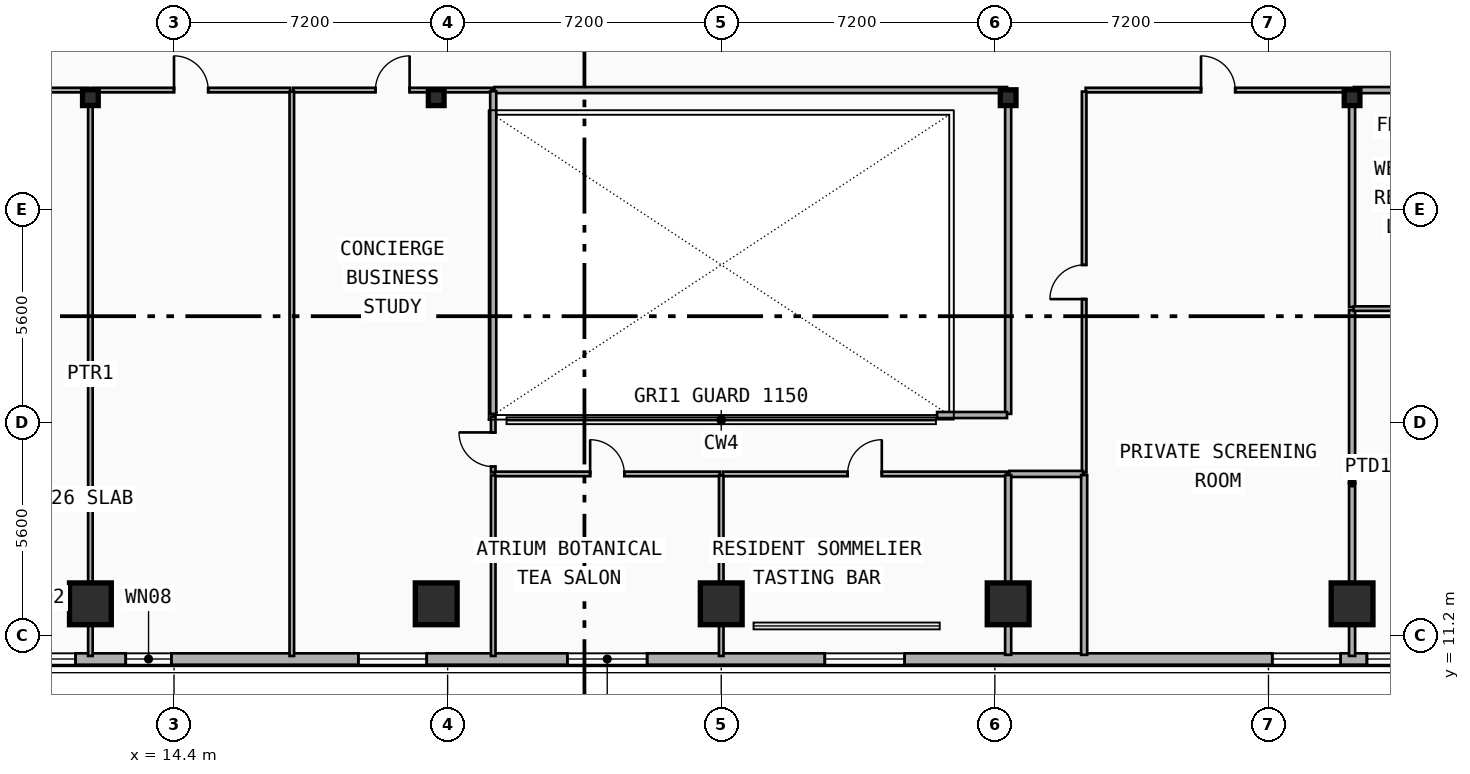
"""IFC4 building model, lengths in metres.
Left out: names, types, materials, properties, quantities, classifications, styles, units other than length and angle.
Written with IfcOpenShell. Run it as: python <this file> out.ifc"""

import sys

from ifc_helpers import new_model, si_unit, direction, frame, frame_2d, origin, origin_2d, place, context, subcontext, project, spatial, rectangle, i_section, extrude, element, fill, save


model = new_model("IFC4")
c1 = context("Model", 3, precision=1e-05, world=origin(), true_north=direction((0.0, 1.0)))
c2 = subcontext(c1, "Body", "Model", "MODEL_VIEW")
j1 = project(units=[si_unit("LENGTHUNIT", "METRE"), si_unit("PLANEANGLEUNIT", "RADIAN")], contexts=[c1])
p1 = place(None, origin())
s1 = spatial("IfcSite", under=j1, at=p1, CompositionType="ELEMENT")
p2 = place(p1, origin())
s2 = spatial("IfcBuilding", under=s1, at=p2, CompositionType="ELEMENT")
p3 = place(p2, frame((0.0, 0.0, 155.45)))
s3 = spatial("IfcBuildingStorey", under=s2, at=p3, CompositionType="ELEMENT", Elevation=155.45)
for number, where, z_axis, x_axis in (
    (1, (12.2, 25.35, 0.0), (0.0, 0.0, 1.0), (1.0, 0.0, 0.0)),
    (2, (21.3, 25.35, 0.0), (0.0, 0.0, 1.0), (1.0, 0.0, 0.0)),
    (3, (36.35, 25.35, 0.0), (0.0, 0.0, 1.0), (1.0, 0.0, 0.0)),
    (4, (45.4, 25.35, 0.0), (0.0, 0.0, 1.0), (1.0, 0.0, 0.0)),
):
    element("IfcColumn", number, at=place(p3, frame(where, z_axis=z_axis, x_axis=x_axis)), inside=s3, PredefinedType="COLUMN", context=c2, shape_type="SweptSolid", body=[
        extrude(i_section(OverallWidth=0.413, OverallDepth=0.415, WebThickness=0.03, FlangeThickness=0.047, FilletRadius=0.015, at=origin_2d()), origin(), (0.0, 0.0, 1.0), 3.55),
    ])
for number, where, z_axis, x_axis in (
    (5, (12.2, 12.141, 0.0), (0.0, -0.09, 0.996), (1.0, 0.0, 0.0)),
    (6, (21.3, 12.141, 0.0), (0.0, -0.09, 0.996), (1.0, 0.0, 0.0)),
    (7, (28.8, 12.141, 0.0), (0.0, -0.09, 0.996), (1.0, 0.0, 0.0)),
    (8, (36.35, 12.141, 0.0), (0.0, -0.09, 0.996), (1.0, 0.0, 0.0)),
    (9, (45.4, 12.141, 0.0), (0.0, -0.09, 0.996), (1.0, 0.0, 0.0)),
):
    element("IfcColumn", number, at=place(p3, frame(where, z_axis=z_axis, x_axis=x_axis)), inside=s3, PredefinedType="COLUMN", context=c2, shape_type="SweptSolid", body=[
        extrude(rectangle(XDim=1.1, YDim=1.1, at=origin_2d()), origin(), (0.0, 0.0, 1.0), 3.565),
    ])
p4 = place(p3, frame((48.0, 10.58, 0.0), z_axis=(0.0, 0.0, 1.0), x_axis=(-1.0, 0.0, 0.0)))
e10 = element("IfcWall", 10, at=p4, inside=s3, PredefinedType="SOLIDWALL", context=c2, shape_type="SweptSolid", body=[
    extrude(rectangle(XDim=38.4, YDim=0.3, at=frame_2d((19.2, 0.0))), origin(), (0.0, 0.0, 1.0), 3.29),
])
p5 = place(p4, frame((36.19, 0.0, 0.34)))
e11 = element("IfcOpeningElement", 11, at=p5, cuts=e10, PredefinedType="OPENING", context=c2, shape_type="SweptSolid", body=[
    extrude(rectangle(XDim=1.8, YDim=1.8, at=frame_2d((0.9, 0.9))), frame((0.0, 0.16, 0.0), z_axis=(0.0, -1.0, 0.0), x_axis=(1.0, 0.0, 0.0)), (0.0, 0.0, 1.0), 0.32),
])
p6 = place(p4, frame((33.67, 0.0, 1.22)))
e12 = element("IfcOpeningElement", 12, at=p6, cuts=e10, PredefinedType="OPENING", context=c2, shape_type="SweptSolid", body=[
    extrude(rectangle(XDim=1.2, YDim=1.5, at=frame_2d((0.6, 0.75))), frame((0.0, 0.16, 0.0), z_axis=(0.0, -1.0, 0.0), x_axis=(1.0, 0.0, 0.0)), (0.0, 0.0, 1.0), 0.32),
])
p7 = place(p4, frame((26.95, 0.0, 0.34)))
e13 = element("IfcOpeningElement", 13, at=p7, cuts=e10, PredefinedType="OPENING", context=c2, shape_type="SweptSolid", body=[
    extrude(rectangle(XDim=1.8, YDim=1.8, at=frame_2d((0.9, 0.9))), frame((0.0, 0.16, 0.0), z_axis=(0.0, -1.0, 0.0), x_axis=(1.0, 0.0, 0.0)), (0.0, 0.0, 1.0), 0.32),
])
p8 = place(p4, frame((21.15, 0.0, 0.65)))
e14 = element("IfcOpeningElement", 14, at=p8, cuts=e10, PredefinedType="OPENING", context=c2, shape_type="SweptSolid", body=[
    extrude(rectangle(XDim=2.1, YDim=2.1, at=frame_2d((1.05, 1.05))), frame((0.0, 0.16, 0.0), z_axis=(0.0, -1.0, 0.0), x_axis=(1.0, 0.0, 0.0)), (0.0, 0.0, 1.0), 0.32),
])
p9 = place(p4, frame((14.375, 0.0, 0.65)))
e15 = element("IfcOpeningElement", 15, at=p9, cuts=e10, PredefinedType="OPENING", context=c2, shape_type="SweptSolid", body=[
    extrude(rectangle(XDim=2.1, YDim=2.1, at=frame_2d((1.05, 1.05))), frame((0.0, 0.16, 0.0), z_axis=(0.0, -1.0, 0.0), x_axis=(1.0, 0.0, 0.0)), (0.0, 0.0, 1.0), 0.32),
])
p10 = place(p4, frame((2.9, 0.0, 0.34)))
e16 = element("IfcOpeningElement", 16, at=p10, cuts=e10, PredefinedType="OPENING", context=c2, shape_type="SweptSolid", body=[
    extrude(rectangle(XDim=1.8, YDim=1.8, at=frame_2d((0.9, 0.9))), frame((0.0, 0.16, 0.0), z_axis=(0.0, -1.0, 0.0), x_axis=(1.0, 0.0, 0.0)), (0.0, 0.0, 1.0), 0.32),
])
p11 = place(p4, frame((0.41, 0.0, 0.34)))
e17 = element("IfcOpeningElement", 17, at=p11, cuts=e10, PredefinedType="OPENING", context=c2, shape_type="SweptSolid", body=[
    extrude(rectangle(XDim=1.8, YDim=1.8, at=frame_2d((0.9, 0.9))), frame((0.0, 0.16, 0.0), z_axis=(0.0, -1.0, 0.0), x_axis=(1.0, 0.0, 0.0)), (0.0, 0.0, 1.0), 0.32),
])
p12 = place(p3, frame((5.66, 25.55, 0.0), z_axis=(0.0, 0.0, 1.0), x_axis=(1.0, 0.0, 0.0)))
e18 = element("IfcWall", 18, at=p12, inside=s3, PredefinedType="PARTITIONING", context=c2, shape_type="SweptSolid", body=[
    extrude(rectangle(XDim=6.5, YDim=0.12, at=frame_2d((3.25, 0.0))), origin(), (0.0, 0.0, 1.0), 2.36),
])
p13 = place(p12, frame((2.8, 0.0, 0.0)))
e19 = element("IfcOpeningElement", 19, at=p13, cuts=e18, PredefinedType="OPENING", context=c2, shape_type="SweptSolid", body=[
    extrude(rectangle(XDim=0.9, YDim=2.1, at=frame_2d((0.45, 1.05))), frame((0.0, 0.07, 0.0), z_axis=(0.0, -1.0, 0.0), x_axis=(1.0, 0.0, 0.0)), (0.0, 0.0, 1.0), 0.14),
])
p14 = place(p3, frame((12.24, 25.55, 0.0), z_axis=(0.0, 0.0, 1.0), x_axis=(1.0, 0.0, 0.0)))
e20 = element("IfcWall", 20, at=p14, inside=s3, PredefinedType="PARTITIONING", context=c2, shape_type="SweptSolid", body=[
    extrude(rectangle(XDim=5.22, YDim=0.12, at=frame_2d((2.61, 0.0))), origin(), (0.0, 0.0, 1.0), 2.36),
])
p15 = place(p14, frame((2.16, 0.0, 0.0)))
e21 = element("IfcOpeningElement", 21, at=p15, cuts=e20, PredefinedType="OPENING", context=c2, shape_type="SweptSolid", body=[
    extrude(rectangle(XDim=0.9, YDim=2.1, at=frame_2d((0.45, 1.05))), frame((0.0, 0.07, 0.0), z_axis=(0.0, -1.0, 0.0), x_axis=(1.0, 0.0, 0.0)), (0.0, 0.0, 1.0), 0.14),
])
p16 = place(p3, frame((17.54, 25.55, 0.0), z_axis=(0.0, 0.0, 1.0), x_axis=(1.0, 0.0, 0.0)))
e22 = element("IfcWall", 22, at=p16, inside=s3, PredefinedType="PARTITIONING", context=c2, shape_type="SweptSolid", body=[
    extrude(rectangle(XDim=5.22, YDim=0.12, at=frame_2d((2.61, 0.0))), origin(), (0.0, 0.0, 1.0), 2.36),
])
p17 = place(p16, frame((2.16, 0.0, 0.0)))
e23 = element("IfcOpeningElement", 23, at=p17, cuts=e22, PredefinedType="OPENING", context=c2, shape_type="SweptSolid", body=[
    extrude(rectangle(XDim=0.9, YDim=2.1, at=frame_2d((0.45, 1.05))), frame((0.0, 0.07, 0.0), z_axis=(0.0, -1.0, 0.0), x_axis=(1.0, 0.0, 0.0)), (0.0, 0.0, 1.0), 0.14),
])
p18 = place(p3, frame((38.39, 25.55, 0.0), z_axis=(0.0, 0.0, 1.0), x_axis=(1.0, 0.0, 0.0)))
e24 = element("IfcWall", 24, at=p18, inside=s3, PredefinedType="PARTITIONING", context=c2, shape_type="SweptSolid", body=[
    extrude(rectangle(XDim=6.97, YDim=0.12, at=frame_2d((3.485, 0.0))), origin(), (0.0, 0.0, 1.0), 2.36),
])
p19 = place(p18, frame((3.035, 0.0, 0.0)))
e25 = element("IfcOpeningElement", 25, at=p19, cuts=e24, PredefinedType="OPENING", context=c2, shape_type="SweptSolid", body=[
    extrude(rectangle(XDim=0.9, YDim=2.1, at=frame_2d((0.45, 1.05))), frame((0.0, 0.07, 0.0), z_axis=(0.0, -1.0, 0.0), x_axis=(1.0, 0.0, 0.0)), (0.0, 0.0, 1.0), 0.14),
])
p20 = place(p3, frame((45.44, 25.55, 0.0), z_axis=(0.0, 0.0, 1.0), x_axis=(1.0, 0.0, 0.0)))
e26 = element("IfcWall", 26, at=p20, inside=s3, PredefinedType="PARTITIONING", context=c2, shape_type="SweptSolid", body=[
    extrude(rectangle(XDim=3.52, YDim=0.16, at=frame_2d((1.76, 0.0))), origin(), (0.0, 0.0, 1.0), 2.36),
])
p21 = place(p20, frame((1.26, 0.0, 0.0)))
e27 = element("IfcOpeningElement", 27, at=p21, cuts=e26, PredefinedType="OPENING", context=c2, shape_type="SweptSolid", body=[
    extrude(rectangle(XDim=1.0, YDim=2.15, at=frame_2d((0.5, 1.075))), frame((0.0, 0.09, 0.0), z_axis=(0.0, -1.0, 0.0), x_axis=(1.0, 0.0, 0.0)), (0.0, 0.0, 1.0), 0.18),
])
p22 = place(p3, frame((38.35, 15.49, 0.0), z_axis=(0.0, 0.0, 1.0), x_axis=(0.0, 1.0, 0.0)))
e28 = element("IfcWall", 28, at=p22, inside=s3, PredefinedType="PARTITIONING", context=c2, shape_type="SweptSolid", body=[
    extrude(rectangle(XDim=10.02, YDim=0.12, at=frame_2d((5.01, 0.0))), origin(), (0.0, 0.0, 1.0), 2.77),
])
p23 = place(p22, frame((4.56, 0.0, 0.0)))
e29 = element("IfcOpeningElement", 29, at=p23, cuts=e28, PredefinedType="OPENING", context=c2, shape_type="SweptSolid", body=[
    extrude(rectangle(XDim=0.9, YDim=2.1, at=frame_2d((0.45, 1.05))), frame((0.0, 0.07, 0.0), z_axis=(0.0, -1.0, 0.0), x_axis=(1.0, 0.0, 0.0)), (0.0, 0.0, 1.0), 0.14),
])
p24 = place(p3, frame((22.8, 15.49, 0.0), z_axis=(0.0, 0.0, 1.0), x_axis=(0.0, 1.0, 0.0)))
e30 = element("IfcWall", 30, at=p24, inside=s3, PredefinedType="PARTITIONING", context=c2, shape_type="SweptSolid", body=[
    extrude(rectangle(XDim=1.47, YDim=0.12, at=frame_2d((0.735, 0.0))), origin(), (0.0, 0.0, 1.0), 2.73),
])
p25 = place(p24, frame((0.152, 0.0, 0.0)))
e31 = element("IfcOpeningElement", 31, at=p25, cuts=e30, PredefinedType="OPENING", context=c2, shape_type="SweptSolid", body=[
    extrude(rectangle(XDim=0.9, YDim=2.1, at=frame_2d((0.45, 1.05))), frame((0.0, 0.07, 0.0), z_axis=(0.0, -1.0, 0.0), x_axis=(1.0, 0.0, 0.0)), (0.0, 0.0, 1.0), 0.14),
])
p26 = place(p3, frame((22.84, 15.45, 0.0), z_axis=(0.0, 0.0, 1.0), x_axis=(1.0, 0.0, 0.0)))
e32 = element("IfcWall", 32, at=p26, inside=s3, PredefinedType="PARTITIONING", context=c2, shape_type="SweptSolid", body=[
    extrude(rectangle(XDim=5.92, YDim=0.12, at=frame_2d((2.96, 0.0))), origin(), (0.0, 0.0, 1.0), 2.36),
])
p27 = place(p26, frame((2.51, 0.0, 0.0)))
e33 = element("IfcOpeningElement", 33, at=p27, cuts=e32, PredefinedType="OPENING", context=c2, shape_type="SweptSolid", body=[
    extrude(rectangle(XDim=0.9, YDim=2.1, at=frame_2d((0.45, 1.05))), frame((0.0, 0.07, 0.0), z_axis=(0.0, -1.0, 0.0), x_axis=(1.0, 0.0, 0.0)), (0.0, 0.0, 1.0), 0.14),
])
p28 = place(p3, frame((28.84, 15.45, 0.0), z_axis=(0.0, 0.0, 1.0), x_axis=(1.0, 0.0, 0.0)))
e34 = element("IfcWall", 34, at=p28, inside=s3, PredefinedType="PARTITIONING", context=c2, shape_type="SweptSolid", body=[
    extrude(rectangle(XDim=7.47, YDim=0.12, at=frame_2d((3.735, 0.0))), origin(), (0.0, 0.0, 1.0), 2.36),
])
p29 = place(p28, frame((3.285, 0.0, 0.0)))
e35 = element("IfcOpeningElement", 35, at=p29, cuts=e34, PredefinedType="OPENING", context=c2, shape_type="SweptSolid", body=[
    extrude(rectangle(XDim=0.9, YDim=2.1, at=frame_2d((0.45, 1.05))), frame((0.0, 0.07, 0.0), z_axis=(0.0, -1.0, 0.0), x_axis=(1.0, 0.0, 0.0)), (0.0, 0.0, 1.0), 0.14),
])
p30 = place(p3, frame((12.2, 10.66, 0.0), z_axis=(0.0, 0.0, 1.0), x_axis=(0.0, 1.0, 0.0)))
e36 = element("IfcWall", 36, at=p30, inside=s3, PredefinedType="PARTITIONING", context=c2, shape_type="SweptSolid", body=[
    extrude(rectangle(XDim=14.85, YDim=0.12, at=frame_2d((7.425, 0.0))), origin(), (0.0, 0.0, 1.0), 2.36),
])
p31 = place(p3, frame((17.5, 10.66, 0.0), z_axis=(0.0, 0.0, 1.0), x_axis=(0.0, 1.0, 0.0)))
e37 = element("IfcWall", 37, at=p31, inside=s3, PredefinedType="PARTITIONING", context=c2, shape_type="SweptSolid", body=[
    extrude(rectangle(XDim=14.85, YDim=0.12, at=frame_2d((7.425, 0.0))), origin(), (0.0, 0.0, 1.0), 2.77),
])
p32 = place(p3, frame((22.8, 10.66, 0.0), z_axis=(0.0, 0.0, 1.0), x_axis=(0.0, 1.0, 0.0)))
e38 = element("IfcWall", 38, at=p32, inside=s3, PredefinedType="PARTITIONING", context=c2, shape_type="SweptSolid", body=[
    extrude(rectangle(XDim=4.75, YDim=0.12, at=frame_2d((2.375, 0.0))), origin(), (0.0, 0.0, 1.0), 2.91),
])
p33 = place(p3, frame((28.8, 10.66, 0.0), z_axis=(0.0, 0.0, 1.0), x_axis=(0.0, 1.0, 0.0)))
e39 = element("IfcWall", 39, at=p33, inside=s3, PredefinedType="PARTITIONING", context=c2, shape_type="SweptSolid", body=[
    extrude(rectangle(XDim=4.75, YDim=0.12, at=frame_2d((2.375, 0.0))), origin(), (0.0, 0.0, 1.0), 2.36),
])
p34 = place(p3, frame((45.4, 10.66, 0.0), z_axis=(0.0, 0.0, 1.0), x_axis=(0.0, 1.0, 0.0)))
e40 = element("IfcWall", 40, at=p34, inside=s3, PredefinedType="PARTITIONING", context=c2, shape_type="SweptSolid", body=[
    extrude(rectangle(XDim=9.1, YDim=0.16, at=frame_2d((4.55, 0.0))), origin(), (0.0, 0.0, 1.0), 2.36),
])
p35 = place(p3, frame((45.4, 19.84, 0.0), z_axis=(0.0, 0.0, 1.0), x_axis=(0.0, 1.0, 0.0)))
e41 = element("IfcWall", 41, at=p35, inside=s3, PredefinedType="PARTITIONING", context=c2, shape_type="SweptSolid", body=[
    extrude(rectangle(XDim=5.67, YDim=0.16, at=frame_2d((2.835, 0.0))), origin(), (0.0, 0.0, 1.0), 2.36),
])
p36 = place(p3, frame((45.44, 19.8, 0.0), z_axis=(0.0, 0.0, 1.0), x_axis=(1.0, 0.0, 0.0)))
e42 = element("IfcWall", 42, at=p36, inside=s3, PredefinedType="PARTITIONING", context=c2, shape_type="SweptSolid", body=[
    extrude(rectangle(XDim=3.52, YDim=0.12, at=frame_2d((1.76, 0.0))), origin(), (0.0, 0.0, 1.0), 2.36),
])
p37 = place(p36, frame((1.31, 0.0, 0.0)))
e43 = element("IfcOpeningElement", 43, at=p37, cuts=e42, PredefinedType="OPENING", context=c2, shape_type="SweptSolid", body=[
    extrude(rectangle(XDim=0.9, YDim=2.1, at=frame_2d((0.45, 1.05))), frame((0.0, 0.07, 0.0), z_axis=(0.0, -1.0, 0.0), x_axis=(1.0, 0.0, 0.0)), (0.0, 0.0, 1.0), 0.14),
])
p38 = place(p3, frame((22.83, 25.55, 0.0), z_axis=(0.0, 0.0, 1.0), x_axis=(1.0, 0.0, 0.0)))
e44 = element("IfcWall", 44, at=p38, inside=s3, PredefinedType="PARTITIONING", context=c2, shape_type="SweptSolid", body=[
    extrude(rectangle(XDim=13.49, YDim=0.16, at=frame_2d((6.745, 0.0))), origin(), (0.0, 0.0, 1.0), 2.36),
])
p39 = place(p3, frame((36.38, 15.45, 0.0), z_axis=(0.0, 0.0, 1.0), x_axis=(1.0, 0.0, 0.0)))
e45 = element("IfcWall", 45, at=p39, inside=s3, PredefinedType="PARTITIONING", context=c2, shape_type="SweptSolid", body=[
    extrude(rectangle(XDim=1.94, YDim=0.16, at=frame_2d((0.97, 0.0))), origin(), (0.0, 0.0, 1.0), 2.36),
])
p40 = place(p3, frame((36.35, 17.03, 0.0), z_axis=(0.0, 0.0, 1.0), x_axis=(0.0, 1.0, 0.0)))
e46 = element("IfcWall", 46, at=p40, inside=s3, PredefinedType="PARTITIONING", context=c2, shape_type="SweptSolid", body=[
    extrude(rectangle(XDim=8.49, YDim=0.16, at=frame_2d((4.245, 0.0))), origin(), (0.0, 0.0, 1.0), 2.36),
])
p41 = place(p3, frame((34.48, 17.0, 0.0), z_axis=(0.0, 0.0, 1.0), x_axis=(1.0, 0.0, 0.0)))
e47 = element("IfcWall", 47, at=p41, inside=s3, PredefinedType="PARTITIONING", context=c2, shape_type="SweptSolid", body=[
    extrude(rectangle(XDim=1.84, YDim=0.16, at=frame_2d((0.92, 0.0))), origin(), (0.0, 0.0, 1.0), 2.36),
])
p42 = place(p3, frame((22.8, 17.03, 0.0), z_axis=(0.0, 0.0, 1.0), x_axis=(0.0, 1.0, 0.0)))
e48 = element("IfcWall", 48, at=p42, inside=s3, PredefinedType="PARTITIONING", context=c2, shape_type="SweptSolid", body=[
    extrude(rectangle(XDim=8.49, YDim=0.16, at=frame_2d((4.245, 0.0))), origin(), (0.0, 0.0, 1.0), 2.73),
])
p43 = place(p3, frame((36.35, 10.69, 0.0), z_axis=(0.0, 0.0, 1.0), x_axis=(0.0, 1.0, 0.0)))
e49 = element("IfcWall", 49, at=p43, inside=s3, PredefinedType="PARTITIONING", context=c2, shape_type="SweptSolid", body=[
    extrude(rectangle(XDim=4.73, YDim=0.16, at=frame_2d((2.365, 0.0))), origin(), (0.0, 0.0, 1.0), 2.36),
])
p44 = place(p3, frame((38.35, 10.69, 0.0), z_axis=(0.0, 0.0, 1.0), x_axis=(0.0, 1.0, 0.0)))
e50 = element("IfcWall", 50, at=p44, inside=s3, PredefinedType="PARTITIONING", context=c2, shape_type="SweptSolid", body=[
    extrude(rectangle(XDim=4.73, YDim=0.16, at=frame_2d((2.365, 0.0))), origin(), (0.0, 0.0, 1.0), 2.77),
])
p45 = place(p5, origin())
e51 = element("IfcWindow", 51, at=p45, inside=s3, PartitioningType="SINGLE_PANEL", PredefinedType="WINDOW", context=c2, shape_type="SweptSolid", body=[
    extrude(rectangle(XDim=1.8, YDim=1.8, at=frame_2d((0.9, 0.9))), frame((0.0, 0.03, 0.0), z_axis=(0.0, -1.0, 0.0), x_axis=(1.0, 0.0, 0.0)), (0.0, 0.0, 1.0), 0.06),
])
fill(e11, e51)
p46 = place(p6, origin())
e52 = element("IfcWindow", 52, at=p46, inside=s3, PartitioningType="SINGLE_PANEL", PredefinedType="WINDOW", context=c2, shape_type="SweptSolid", body=[
    extrude(rectangle(XDim=1.2, YDim=1.5, at=frame_2d((0.6, 0.75))), frame((0.0, 0.03, 0.0), z_axis=(0.0, -1.0, 0.0), x_axis=(1.0, 0.0, 0.0)), (0.0, 0.0, 1.0), 0.06),
])
fill(e12, e52)
p47 = place(p7, origin())
e53 = element("IfcWindow", 53, at=p47, inside=s3, PartitioningType="SINGLE_PANEL", PredefinedType="WINDOW", context=c2, shape_type="SweptSolid", body=[
    extrude(rectangle(XDim=1.8, YDim=1.8, at=frame_2d((0.9, 0.9))), frame((0.0, 0.03, 0.0), z_axis=(0.0, -1.0, 0.0), x_axis=(1.0, 0.0, 0.0)), (0.0, 0.0, 1.0), 0.06),
])
fill(e13, e53)
p48 = place(p8, origin())
e54 = element("IfcWindow", 54, at=p48, inside=s3, PartitioningType="SINGLE_PANEL", PredefinedType="WINDOW", context=c2, shape_type="SweptSolid", body=[
    extrude(rectangle(XDim=2.1, YDim=2.1, at=frame_2d((1.05, 1.05))), frame((0.0, 0.03, 0.0), z_axis=(0.0, -1.0, 0.0), x_axis=(1.0, 0.0, 0.0)), (0.0, 0.0, 1.0), 0.06),
])
fill(e14, e54)
p49 = place(p9, origin())
e55 = element("IfcWindow", 55, at=p49, inside=s3, PartitioningType="SINGLE_PANEL", PredefinedType="WINDOW", context=c2, shape_type="SweptSolid", body=[
    extrude(rectangle(XDim=2.1, YDim=2.1, at=frame_2d((1.05, 1.05))), frame((0.0, 0.03, 0.0), z_axis=(0.0, -1.0, 0.0), x_axis=(1.0, 0.0, 0.0)), (0.0, 0.0, 1.0), 0.06),
])
fill(e15, e55)
p50 = place(p10, origin())
e56 = element("IfcWindow", 56, at=p50, inside=s3, PartitioningType="SINGLE_PANEL", PredefinedType="WINDOW", context=c2, shape_type="SweptSolid", body=[
    extrude(rectangle(XDim=1.8, YDim=1.8, at=frame_2d((0.9, 0.9))), frame((0.0, 0.03, 0.0), z_axis=(0.0, -1.0, 0.0), x_axis=(1.0, 0.0, 0.0)), (0.0, 0.0, 1.0), 0.06),
])
fill(e16, e56)
p51 = place(p11, origin())
e57 = element("IfcWindow", 57, at=p51, inside=s3, PartitioningType="SINGLE_PANEL", PredefinedType="WINDOW", context=c2, shape_type="SweptSolid", body=[
    extrude(rectangle(XDim=1.8, YDim=1.8, at=frame_2d((0.9, 0.9))), frame((0.0, 0.03, 0.0), z_axis=(0.0, -1.0, 0.0), x_axis=(1.0, 0.0, 0.0)), (0.0, 0.0, 1.0), 0.06),
])
fill(e17, e57)
p52 = place(p15, origin())
e58 = element("IfcDoor", 58, at=p52, inside=s3, OperationType="SINGLE_SWING_LEFT", PredefinedType="DOOR", context=c2, shape_type="SweptSolid", body=[
    extrude(rectangle(XDim=0.9, YDim=2.1, at=frame_2d((0.45, 1.05))), frame((0.0, 0.025, 0.0), z_axis=(0.0, -1.0, 0.0), x_axis=(1.0, 0.0, 0.0)), (0.0, 0.0, 1.0), 0.05),
])
fill(e21, e58)
p53 = place(p17, origin())
e59 = element("IfcDoor", 59, at=p53, inside=s3, OperationType="SINGLE_SWING_RIGHT", PredefinedType="DOOR", context=c2, shape_type="SweptSolid", body=[
    extrude(rectangle(XDim=0.9, YDim=2.1, at=frame_2d((0.45, 1.05))), frame((0.0, 0.025, 0.0), z_axis=(0.0, -1.0, 0.0), x_axis=(1.0, 0.0, 0.0)), (0.0, 0.0, 1.0), 0.05),
])
fill(e23, e59)
p54 = place(p19, origin())
e60 = element("IfcDoor", 60, at=p54, inside=s3, OperationType="SINGLE_SWING_LEFT", PredefinedType="DOOR", context=c2, shape_type="SweptSolid", body=[
    extrude(rectangle(XDim=0.9, YDim=2.1, at=frame_2d((0.45, 1.05))), frame((0.0, 0.025, 0.0), z_axis=(0.0, -1.0, 0.0), x_axis=(1.0, 0.0, 0.0)), (0.0, 0.0, 1.0), 0.05),
])
fill(e25, e60)
p55 = place(p23, origin())
e61 = element("IfcDoor", 61, at=p55, inside=s3, OperationType="SINGLE_SWING_LEFT", PredefinedType="DOOR", context=c2, shape_type="SweptSolid", body=[
    extrude(rectangle(XDim=0.9, YDim=2.1, at=frame_2d((0.45, 1.05))), frame((0.0, 0.025, 0.0), z_axis=(0.0, -1.0, 0.0), x_axis=(1.0, 0.0, 0.0)), (0.0, 0.0, 1.0), 0.05),
])
fill(e29, e61)
p56 = place(p25, origin())
e62 = element("IfcDoor", 62, at=p56, inside=s3, OperationType="SINGLE_SWING_RIGHT", PredefinedType="DOOR", context=c2, shape_type="SweptSolid", body=[
    extrude(rectangle(XDim=0.9, YDim=2.1, at=frame_2d((0.45, 1.05))), frame((0.0, 0.025, 0.0), z_axis=(0.0, -1.0, 0.0), x_axis=(1.0, 0.0, 0.0)), (0.0, 0.0, 1.0), 0.05),
])
fill(e31, e62)
p57 = place(p27, origin())
e63 = element("IfcDoor", 63, at=p57, inside=s3, OperationType="SINGLE_SWING_LEFT", PredefinedType="DOOR", context=c2, shape_type="SweptSolid", body=[
    extrude(rectangle(XDim=0.9, YDim=2.1, at=frame_2d((0.45, 1.05))), frame((0.0, 0.025, 0.0), z_axis=(0.0, -1.0, 0.0), x_axis=(1.0, 0.0, 0.0)), (0.0, 0.0, 1.0), 0.05),
])
fill(e33, e63)
p58 = place(p29, origin())
e64 = element("IfcDoor", 64, at=p58, inside=s3, OperationType="SINGLE_SWING_RIGHT", PredefinedType="DOOR", context=c2, shape_type="SweptSolid", body=[
    extrude(rectangle(XDim=0.9, YDim=2.1, at=frame_2d((0.45, 1.05))), frame((0.0, 0.025, 0.0), z_axis=(0.0, -1.0, 0.0), x_axis=(1.0, 0.0, 0.0)), (0.0, 0.0, 1.0), 0.05),
])
fill(e35, e64)
save(model, sys.argv[1])
